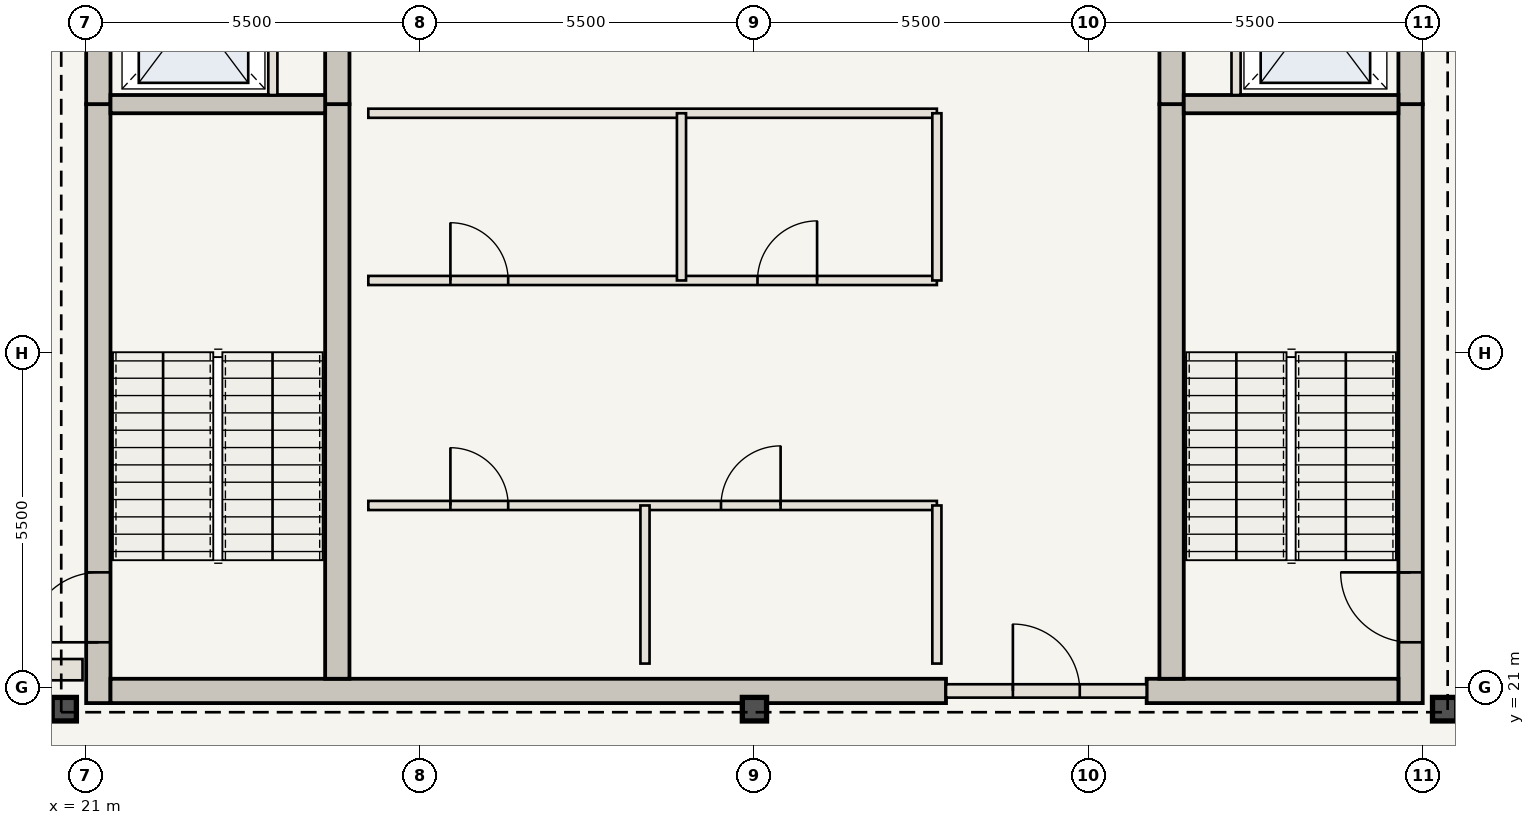
"""IFC4 building model, lengths in metres.
Left out: names, types, materials, properties, quantities, classifications, styles, units other than length and angle.
Written with IfcOpenShell. Run it as: python <this file> out.ifc"""

import sys

from ifc_helpers import new_model, si_unit, direction, frame, frame_2d, origin, origin_2d, place, context, subcontext, project, spatial, rectangle, i_section, extrude, element, fill, save


model = new_model("IFC4")
c1 = context("Model", 3, precision=1e-05, world=origin(), true_north=direction((0.0, 1.0)))
c2 = subcontext(c1, "Body", "Model", "MODEL_VIEW")
j1 = project(units=[si_unit("LENGTHUNIT", "METRE"), si_unit("PLANEANGLEUNIT", "RADIAN")], contexts=[c1])
p1 = place(None, origin())
s1 = spatial("IfcSite", under=j1, at=p1, CompositionType="ELEMENT")
p2 = place(p1, origin())
s2 = spatial("IfcBuilding", under=s1, at=p2, CompositionType="ELEMENT")
p3 = place(p2, frame((0.0, 0.0, 326.9)))
s3 = spatial("IfcBuildingStorey", under=s2, at=p3, CompositionType="ELEMENT", Elevation=326.9)
p4 = place(p3, frame((21.21, 20.75, 0.0), z_axis=(0.0, 0.0, 1.0), x_axis=(0.0, 1.0, 0.0)))
e1 = element("IfcWall", 1, at=p4, inside=s3, PredefinedType="SHEAR", context=c2, shape_type="SweptSolid", body=[
    extrude(rectangle(XDim=9.85, YDim=0.4, at=frame_2d((4.925, 0.0))), origin(), (0.0, 0.0, 1.0), 4.55),
])
p5 = place(p4, frame((1.0, 0.0, 0.0)))
e2 = element("IfcOpeningElement", 2, at=p5, cuts=e1, PredefinedType="OPENING", context=c2, shape_type="SweptSolid", body=[
    extrude(rectangle(XDim=1.15, YDim=2.15, at=frame_2d((0.575, 1.075))), frame((0.0, 0.21, 0.0), z_axis=(0.0, -1.0, 0.0), x_axis=(1.0, 0.0, 0.0)), (0.0, 0.0, 1.0), 0.42),
])
p6 = place(p3, frame((21.21, 30.6, 0.0), z_axis=(0.0, 0.0, 1.0), x_axis=(0.0, 1.0, 0.0)))
e3 = element("IfcWall", 3, at=p6, inside=s3, PredefinedType="SHEAR", context=c2, shape_type="SweptSolid", body=[
    extrude(rectangle(XDim=12.6, YDim=0.4, at=frame_2d((6.3, 0.0))), origin(), (0.0, 0.0, 1.0), 4.55),
])
p7 = place(p6, frame((4.2, 0.0, 0.0)))
e4 = element("IfcOpeningElement", 4, at=p7, cuts=e3, PredefinedType="OPENING", context=c2, shape_type="SweptSolid", body=[
    extrude(rectangle(XDim=1.1, YDim=2.15, at=frame_2d((0.55, 1.075))), frame((0.0, 0.21, 0.0), z_axis=(0.0, -1.0, 0.0), x_axis=(1.0, 0.0, 0.0)), (0.0, 0.0, 1.0), 0.42),
])
p8 = place(p6, frame((9.2, 0.0, 0.0)))
e5 = element("IfcOpeningElement", 5, at=p8, cuts=e3, PredefinedType="OPENING", context=c2, shape_type="SweptSolid", body=[
    extrude(rectangle(XDim=0.92, YDim=2.1, at=frame_2d((0.46, 1.05))), frame((0.0, 0.21, 0.0), z_axis=(0.0, -1.0, 0.0), x_axis=(1.0, 0.0, 0.0)), (0.0, 0.0, 1.0), 0.42),
])
p9 = place(p3, frame((42.79, 20.75, 0.0), z_axis=(0.0, 0.0, 1.0), x_axis=(0.0, 1.0, 0.0)))
e6 = element("IfcWall", 6, at=p9, inside=s3, PredefinedType="SHEAR", context=c2, shape_type="SweptSolid", body=[
    extrude(rectangle(XDim=9.85, YDim=0.4, at=frame_2d((4.925, 0.0))), origin(), (0.0, 0.0, 1.0), 4.55),
])
p10 = place(p9, frame((1.0, 0.0, 0.0)))
e7 = element("IfcOpeningElement", 7, at=p10, cuts=e6, PredefinedType="OPENING", context=c2, shape_type="SweptSolid", body=[
    extrude(rectangle(XDim=1.15, YDim=2.15, at=frame_2d((0.575, 1.075))), frame((0.0, 0.21, 0.0), z_axis=(0.0, -1.0, 0.0), x_axis=(1.0, 0.0, 0.0)), (0.0, 0.0, 1.0), 0.42),
])
p11 = place(p3, frame((42.79, 30.6, 0.0), z_axis=(0.0, 0.0, 1.0), x_axis=(0.0, 1.0, 0.0)))
e8 = element("IfcWall", 8, at=p11, inside=s3, PredefinedType="SHEAR", context=c2, shape_type="SweptSolid", body=[
    extrude(rectangle(XDim=12.6, YDim=0.4, at=frame_2d((6.3, 0.0))), origin(), (0.0, 0.0, 1.0), 4.55),
])
p12 = place(p11, frame((4.2, 0.0, 0.0)))
e9 = element("IfcOpeningElement", 9, at=p12, cuts=e8, PredefinedType="OPENING", context=c2, shape_type="SweptSolid", body=[
    extrude(rectangle(XDim=1.1, YDim=2.15, at=frame_2d((0.55, 1.075))), frame((0.0, 0.21, 0.0), z_axis=(0.0, -1.0, 0.0), x_axis=(1.0, 0.0, 0.0)), (0.0, 0.0, 1.0), 0.42),
])
p13 = place(p11, frame((8.4, 0.0, 0.0)))
e10 = element("IfcOpeningElement", 10, at=p13, cuts=e8, PredefinedType="OPENING", context=c2, shape_type="SweptSolid", body=[
    extrude(rectangle(XDim=0.88, YDim=2.1, at=frame_2d((0.44, 1.05))), frame((0.0, 0.21, 0.0), z_axis=(0.0, -1.0, 0.0), x_axis=(1.0, 0.0, 0.0)), (0.0, 0.0, 1.0), 0.42),
])
p14 = place(p11, frame((10.5, 0.0, 0.0)))
e11 = element("IfcOpeningElement", 11, at=p14, cuts=e8, PredefinedType="OPENING", context=c2, shape_type="SweptSolid", body=[
    extrude(rectangle(XDim=0.88, YDim=2.1, at=frame_2d((0.44, 1.05))), frame((0.0, 0.21, 0.0), z_axis=(0.0, -1.0, 0.0), x_axis=(1.0, 0.0, 0.0)), (0.0, 0.0, 1.0), 0.42),
])
p15 = place(p3, frame((21.41, 20.95, 0.0), z_axis=(0.0, 0.0, 1.0), x_axis=(1.0, 0.0, 0.0)))
e12 = element("IfcWall", 12, at=p15, inside=s3, PredefinedType="SHEAR", context=c2, shape_type="SweptSolid", body=[
    extrude(rectangle(XDim=13.74, YDim=0.4, at=frame_2d((6.87, 0.0))), origin(), (0.0, 0.0, 1.0), 4.55),
])
p16 = place(p3, frame((38.45, 20.95, 0.0), z_axis=(0.0, 0.0, 1.0), x_axis=(1.0, 0.0, 0.0)))
e13 = element("IfcWall", 13, at=p16, inside=s3, PredefinedType="SHEAR", context=c2, shape_type="SweptSolid", body=[
    extrude(rectangle(XDim=4.14, YDim=0.4, at=frame_2d((2.07, 0.0))), origin(), (0.0, 0.0, 1.0), 4.55),
])
p17 = place(p3, frame((25.14, 21.15, 0.0), z_axis=(0.0, 0.0, 1.0), x_axis=(0.0, 1.0, 0.0)))
e14 = element("IfcWall", 14, at=p17, inside=s3, PredefinedType="SHEAR", context=c2, shape_type="SweptSolid", body=[
    extrude(rectangle(XDim=9.45, YDim=0.4, at=frame_2d((4.725, 0.0))), origin(), (0.0, 0.0, 1.0), 4.55),
])
p18 = place(p3, frame((25.14, 30.6, 0.0), z_axis=(0.0, 0.0, 1.0), x_axis=(0.0, 1.0, 0.0)))
e15 = element("IfcWall", 15, at=p18, inside=s3, PredefinedType="SHEAR", context=c2, shape_type="SweptSolid", body=[
    extrude(rectangle(XDim=12.2, YDim=0.4, at=frame_2d((6.1, 0.0))), origin(), (0.0, 0.0, 1.0), 4.55),
])
p19 = place(p18, frame((6.25, 0.0, 0.0)))
e16 = element("IfcOpeningElement", 16, at=p19, cuts=e15, PredefinedType="OPENING", context=c2, shape_type="SweptSolid", body=[
    extrude(rectangle(XDim=1.1, YDim=2.15, at=frame_2d((0.55, 1.075))), frame((0.0, 0.21, 0.0), z_axis=(0.0, -1.0, 0.0), x_axis=(1.0, 0.0, 0.0)), (0.0, 0.0, 1.0), 0.42),
])
p20 = place(p3, frame((38.86, 21.15, 0.0), z_axis=(0.0, 0.0, 1.0), x_axis=(0.0, 1.0, 0.0)))
e17 = element("IfcWall", 17, at=p20, inside=s3, PredefinedType="SHEAR", context=c2, shape_type="SweptSolid", body=[
    extrude(rectangle(XDim=9.45, YDim=0.4, at=frame_2d((4.725, 0.0))), origin(), (0.0, 0.0, 1.0), 4.55),
])
p21 = place(p3, frame((38.86, 30.6, 0.0), z_axis=(0.0, 0.0, 1.0), x_axis=(0.0, 1.0, 0.0)))
e18 = element("IfcWall", 18, at=p21, inside=s3, PredefinedType="SHEAR", context=c2, shape_type="SweptSolid", body=[
    extrude(rectangle(XDim=12.2, YDim=0.4, at=frame_2d((6.1, 0.0))), origin(), (0.0, 0.0, 1.0), 4.55),
])
for number, where, z_axis, x_axis in (
    (19, (20.65, 20.65, 0.0), (0.0, 0.0, 1.0), (1.0, 0.0, 0.0)),
    (20, (32.0, 20.65, 0.0), (0.0, 0.0, 1.0), (1.0, 0.0, 0.0)),
    (21, (43.35, 20.65, 0.0), (0.0, 0.0, 1.0), (1.0, 0.0, 0.0)),
):
    element("IfcColumn", number, at=place(p3, frame(where, z_axis=z_axis, x_axis=x_axis)), inside=s3, PredefinedType="COLUMN", context=c2, shape_type="SweptSolid", body=[
        extrude(i_section(OverallWidth=0.398, OverallDepth=0.387, WebThickness=0.021, FlangeThickness=0.033, at=origin_2d()), origin(), (0.0, 0.0, 1.0), 4.55),
    ])
for number, where, z_axis, x_axis in (
    (22, (21.41, 30.6, 0.0), (0.0, 0.0, 1.0), (1.0, 0.0, 0.0)),
    (23, (39.06, 30.6, 0.0), (0.0, 0.0, 1.0), (1.0, 0.0, 0.0)),
):
    element("IfcWall", number, at=place(p3, frame(where, z_axis=z_axis, x_axis=x_axis)), inside=s3, PredefinedType="SHEAR", context=c2, shape_type="SweptSolid", body=[
        extrude(rectangle(XDim=3.53, YDim=0.3, at=frame_2d((1.765, 0.0))), origin(), (0.0, 0.0, 1.0), 4.29),
    ])
for number, where, z_axis, x_axis in (
    (24, (24.08, 30.75, 0.0), (0.0, 0.0, 1.0), (0.0, 1.0, 0.0)),
    (25, (39.92, 30.75, 0.0), (0.0, 0.0, 1.0), (0.0, 1.0, 0.0)),
):
    element("IfcWall", number, at=place(p3, frame(where, z_axis=z_axis, x_axis=x_axis)), inside=s3, PredefinedType="STANDARD", context=c2, shape_type="SweptSolid", body=[
        extrude(rectangle(XDim=2.65, YDim=0.15, at=frame_2d((1.325, 0.0))), origin(), (0.0, 0.0, 1.0), 4.29),
    ])
p22 = place(p3, frame((35.15, 20.95, 0.0), z_axis=(0.0, 0.0, 1.0), x_axis=(1.0, 0.0, 0.0)))
e26 = element("IfcWall", 26, at=p22, inside=s3, PredefinedType="STANDARD", context=c2, shape_type="SweptSolid", body=[
    extrude(rectangle(XDim=3.3, YDim=0.22, at=frame_2d((1.65, 0.0))), origin(), (0.0, 0.0, 1.0), 4.29),
])
p23 = place(p22, frame((1.1, 0.0, 0.0)))
e27 = element("IfcOpeningElement", 27, at=p23, cuts=e26, PredefinedType="OPENING", context=c2, shape_type="SweptSolid", body=[
    extrude(rectangle(XDim=1.1, YDim=2.15, at=frame_2d((0.55, 1.075))), frame((0.0, 0.12, 0.0), z_axis=(0.0, -1.0, 0.0), x_axis=(1.0, 0.0, 0.0)), (0.0, 0.0, 1.0), 0.24),
])
p24 = place(p3, frame((25.65, 24.0, 0.0), z_axis=(0.0, 0.0, 1.0), x_axis=(1.0, 0.0, 0.0)))
e28 = element("IfcWall", 28, at=p24, inside=s3, PredefinedType="STANDARD", context=c2, shape_type="SweptSolid", body=[
    extrude(rectangle(XDim=9.35, YDim=0.15, at=frame_2d((4.675, 0.0))), origin(), (0.0, 0.0, 1.0), 4.29),
])
p25 = place(p24, frame((1.35, 0.0, 0.0)))
e29 = element("IfcOpeningElement", 29, at=p25, cuts=e28, PredefinedType="OPENING", context=c2, shape_type="SweptSolid", body=[
    extrude(rectangle(XDim=0.95, YDim=2.15, at=frame_2d((0.475, 1.075))), frame((0.0, 0.085, 0.0), z_axis=(0.0, -1.0, 0.0), x_axis=(1.0, 0.0, 0.0)), (0.0, 0.0, 1.0), 0.17),
])
p26 = place(p24, frame((5.8, 0.0, 0.0)))
e30 = element("IfcOpeningElement", 30, at=p26, cuts=e28, PredefinedType="OPENING", context=c2, shape_type="SweptSolid", body=[
    extrude(rectangle(XDim=0.98, YDim=2.2, at=frame_2d((0.49, 1.1))), frame((0.0, 0.085, 0.0), z_axis=(0.0, -1.0, 0.0), x_axis=(1.0, 0.0, 0.0)), (0.0, 0.0, 1.0), 0.17),
])
for number, where, z_axis, x_axis in (
    (31, (30.2, 21.4, 0.0), (0.0, 0.0, 1.0), (0.0, 1.0, 0.0)),
    (32, (35.0, 21.4, 0.0), (0.0, 0.0, 1.0), (0.0, 1.0, 0.0)),
):
    element("IfcWall", number, at=place(p3, frame(where, z_axis=z_axis, x_axis=x_axis)), inside=s3, PredefinedType="STANDARD", context=c2, shape_type="SweptSolid", body=[
        extrude(rectangle(XDim=2.6, YDim=0.15, at=frame_2d((1.3, 0.0))), origin(), (0.0, 0.0, 1.0), 4.29),
    ])
p27 = place(p3, frame((25.65, 27.7, 0.0), z_axis=(0.0, 0.0, 1.0), x_axis=(1.0, 0.0, 0.0)))
e33 = element("IfcWall", 33, at=p27, inside=s3, PredefinedType="STANDARD", context=c2, shape_type="SweptSolid", body=[
    extrude(rectangle(XDim=9.35, YDim=0.15, at=frame_2d((4.675, 0.0))), origin(), (0.0, 0.0, 1.0), 4.29),
])
p28 = place(p27, frame((1.35, 0.0, 0.0)))
e34 = element("IfcOpeningElement", 34, at=p28, cuts=e33, PredefinedType="OPENING", context=c2, shape_type="SweptSolid", body=[
    extrude(rectangle(XDim=0.95, YDim=2.15, at=frame_2d((0.475, 1.075))), frame((0.0, 0.085, 0.0), z_axis=(0.0, -1.0, 0.0), x_axis=(1.0, 0.0, 0.0)), (0.0, 0.0, 1.0), 0.17),
])
p29 = place(p27, frame((6.4, 0.0, 0.0)))
e35 = element("IfcOpeningElement", 35, at=p29, cuts=e33, PredefinedType="OPENING", context=c2, shape_type="SweptSolid", body=[
    extrude(rectangle(XDim=0.98, YDim=2.2, at=frame_2d((0.49, 1.1))), frame((0.0, 0.085, 0.0), z_axis=(0.0, -1.0, 0.0), x_axis=(1.0, 0.0, 0.0)), (0.0, 0.0, 1.0), 0.17),
])
p30 = place(p3, frame((25.65, 30.45, 0.0), z_axis=(0.0, 0.0, 1.0), x_axis=(1.0, 0.0, 0.0)))
e36 = element("IfcWall", 36, at=p30, inside=s3, PredefinedType="STANDARD", context=c2, shape_type="SweptSolid", body=[
    extrude(rectangle(XDim=9.35, YDim=0.15, at=frame_2d((4.675, 0.0))), origin(), (0.0, 0.0, 1.0), 4.29),
])
for number, where, z_axis, x_axis in (
    (37, (30.8, 27.7, 0.0), (0.0, 0.0, 1.0), (0.0, 1.0, 0.0)),
    (38, (35.0, 27.7, 0.0), (0.0, 0.0, 1.0), (0.0, 1.0, 0.0)),
):
    element("IfcWall", number, at=place(p3, frame(where, z_axis=z_axis, x_axis=x_axis)), inside=s3, PredefinedType="STANDARD", context=c2, shape_type="SweptSolid", body=[
        extrude(rectangle(XDim=2.75, YDim=0.15, at=frame_2d((1.375, 0.0))), origin(), (0.0, 0.0, 1.0), 4.29),
    ])
p31 = place(p3, frame((18.4, 21.3, 0.0), z_axis=(0.0, 0.0, 1.0), x_axis=(1.0, 0.0, 0.0)))
e39 = element("IfcWall", 39, at=p31, inside=s3, PredefinedType="STANDARD", context=c2, shape_type="SweptSolid", body=[
    extrude(rectangle(XDim=2.55, YDim=0.35, at=frame_2d((1.275, 0.0))), origin(), (0.0, 0.0, 1.0), 4.29),
])
p32 = place(p5, origin())
e40 = element("IfcDoor", 40, at=p32, inside=s3, OperationType="SINGLE_SWING_LEFT", PredefinedType="DOOR", context=c2, shape_type="SweptSolid", body=[
    extrude(rectangle(XDim=1.15, YDim=2.15, at=frame_2d((0.575, 1.075))), frame((0.0, 0.025, 0.0), z_axis=(0.0, -1.0, 0.0), x_axis=(1.0, 0.0, 0.0)), (0.0, 0.0, 1.0), 0.05),
])
fill(e2, e40)
p33 = place(p10, origin())
e41 = element("IfcDoor", 41, at=p33, inside=s3, OperationType="SINGLE_SWING_RIGHT", PredefinedType="DOOR", context=c2, shape_type="SweptSolid", body=[
    extrude(rectangle(XDim=1.15, YDim=2.15, at=frame_2d((0.575, 1.075))), frame((0.0, 0.025, 0.0), z_axis=(0.0, -1.0, 0.0), x_axis=(1.0, 0.0, 0.0)), (0.0, 0.0, 1.0), 0.05),
])
fill(e7, e41)
p34 = place(p23, origin())
e42 = element("IfcDoor", 42, at=p34, inside=s3, OperationType="SINGLE_SWING_LEFT", PredefinedType="DOOR", context=c2, shape_type="SweptSolid", body=[
    extrude(rectangle(XDim=1.1, YDim=2.15, at=frame_2d((0.55, 1.075))), frame((0.0, 0.025, 0.0), z_axis=(0.0, -1.0, 0.0), x_axis=(1.0, 0.0, 0.0)), (0.0, 0.0, 1.0), 0.05),
])
fill(e27, e42)
p35 = place(p25, origin())
e43 = element("IfcDoor", 43, at=p35, inside=s3, OperationType="SINGLE_SWING_LEFT", PredefinedType="DOOR", context=c2, shape_type="SweptSolid", body=[
    extrude(rectangle(XDim=0.95, YDim=2.15, at=frame_2d((0.475, 1.075))), frame((0.0, 0.025, 0.0), z_axis=(0.0, -1.0, 0.0), x_axis=(1.0, 0.0, 0.0)), (0.0, 0.0, 1.0), 0.05),
])
fill(e29, e43)
p36 = place(p26, origin())
e44 = element("IfcDoor", 44, at=p36, inside=s3, OperationType="SINGLE_SWING_RIGHT", PredefinedType="DOOR", context=c2, shape_type="SweptSolid", body=[
    extrude(rectangle(XDim=0.98, YDim=2.2, at=frame_2d((0.49, 1.1))), frame((0.0, 0.025, 0.0), z_axis=(0.0, -1.0, 0.0), x_axis=(1.0, 0.0, 0.0)), (0.0, 0.0, 1.0), 0.05),
])
fill(e30, e44)
p37 = place(p28, origin())
e45 = element("IfcDoor", 45, at=p37, inside=s3, OperationType="SINGLE_SWING_LEFT", PredefinedType="DOOR", context=c2, shape_type="SweptSolid", body=[
    extrude(rectangle(XDim=0.95, YDim=2.15, at=frame_2d((0.475, 1.075))), frame((0.0, 0.025, 0.0), z_axis=(0.0, -1.0, 0.0), x_axis=(1.0, 0.0, 0.0)), (0.0, 0.0, 1.0), 0.05),
])
fill(e34, e45)
p38 = place(p29, origin())
e46 = element("IfcDoor", 46, at=p38, inside=s3, OperationType="SINGLE_SWING_RIGHT", PredefinedType="DOOR", context=c2, shape_type="SweptSolid", body=[
    extrude(rectangle(XDim=0.98, YDim=2.2, at=frame_2d((0.49, 1.1))), frame((0.0, 0.025, 0.0), z_axis=(0.0, -1.0, 0.0), x_axis=(1.0, 0.0, 0.0)), (0.0, 0.0, 1.0), 0.05),
])
fill(e35, e46)
save(model, sys.argv[1])
